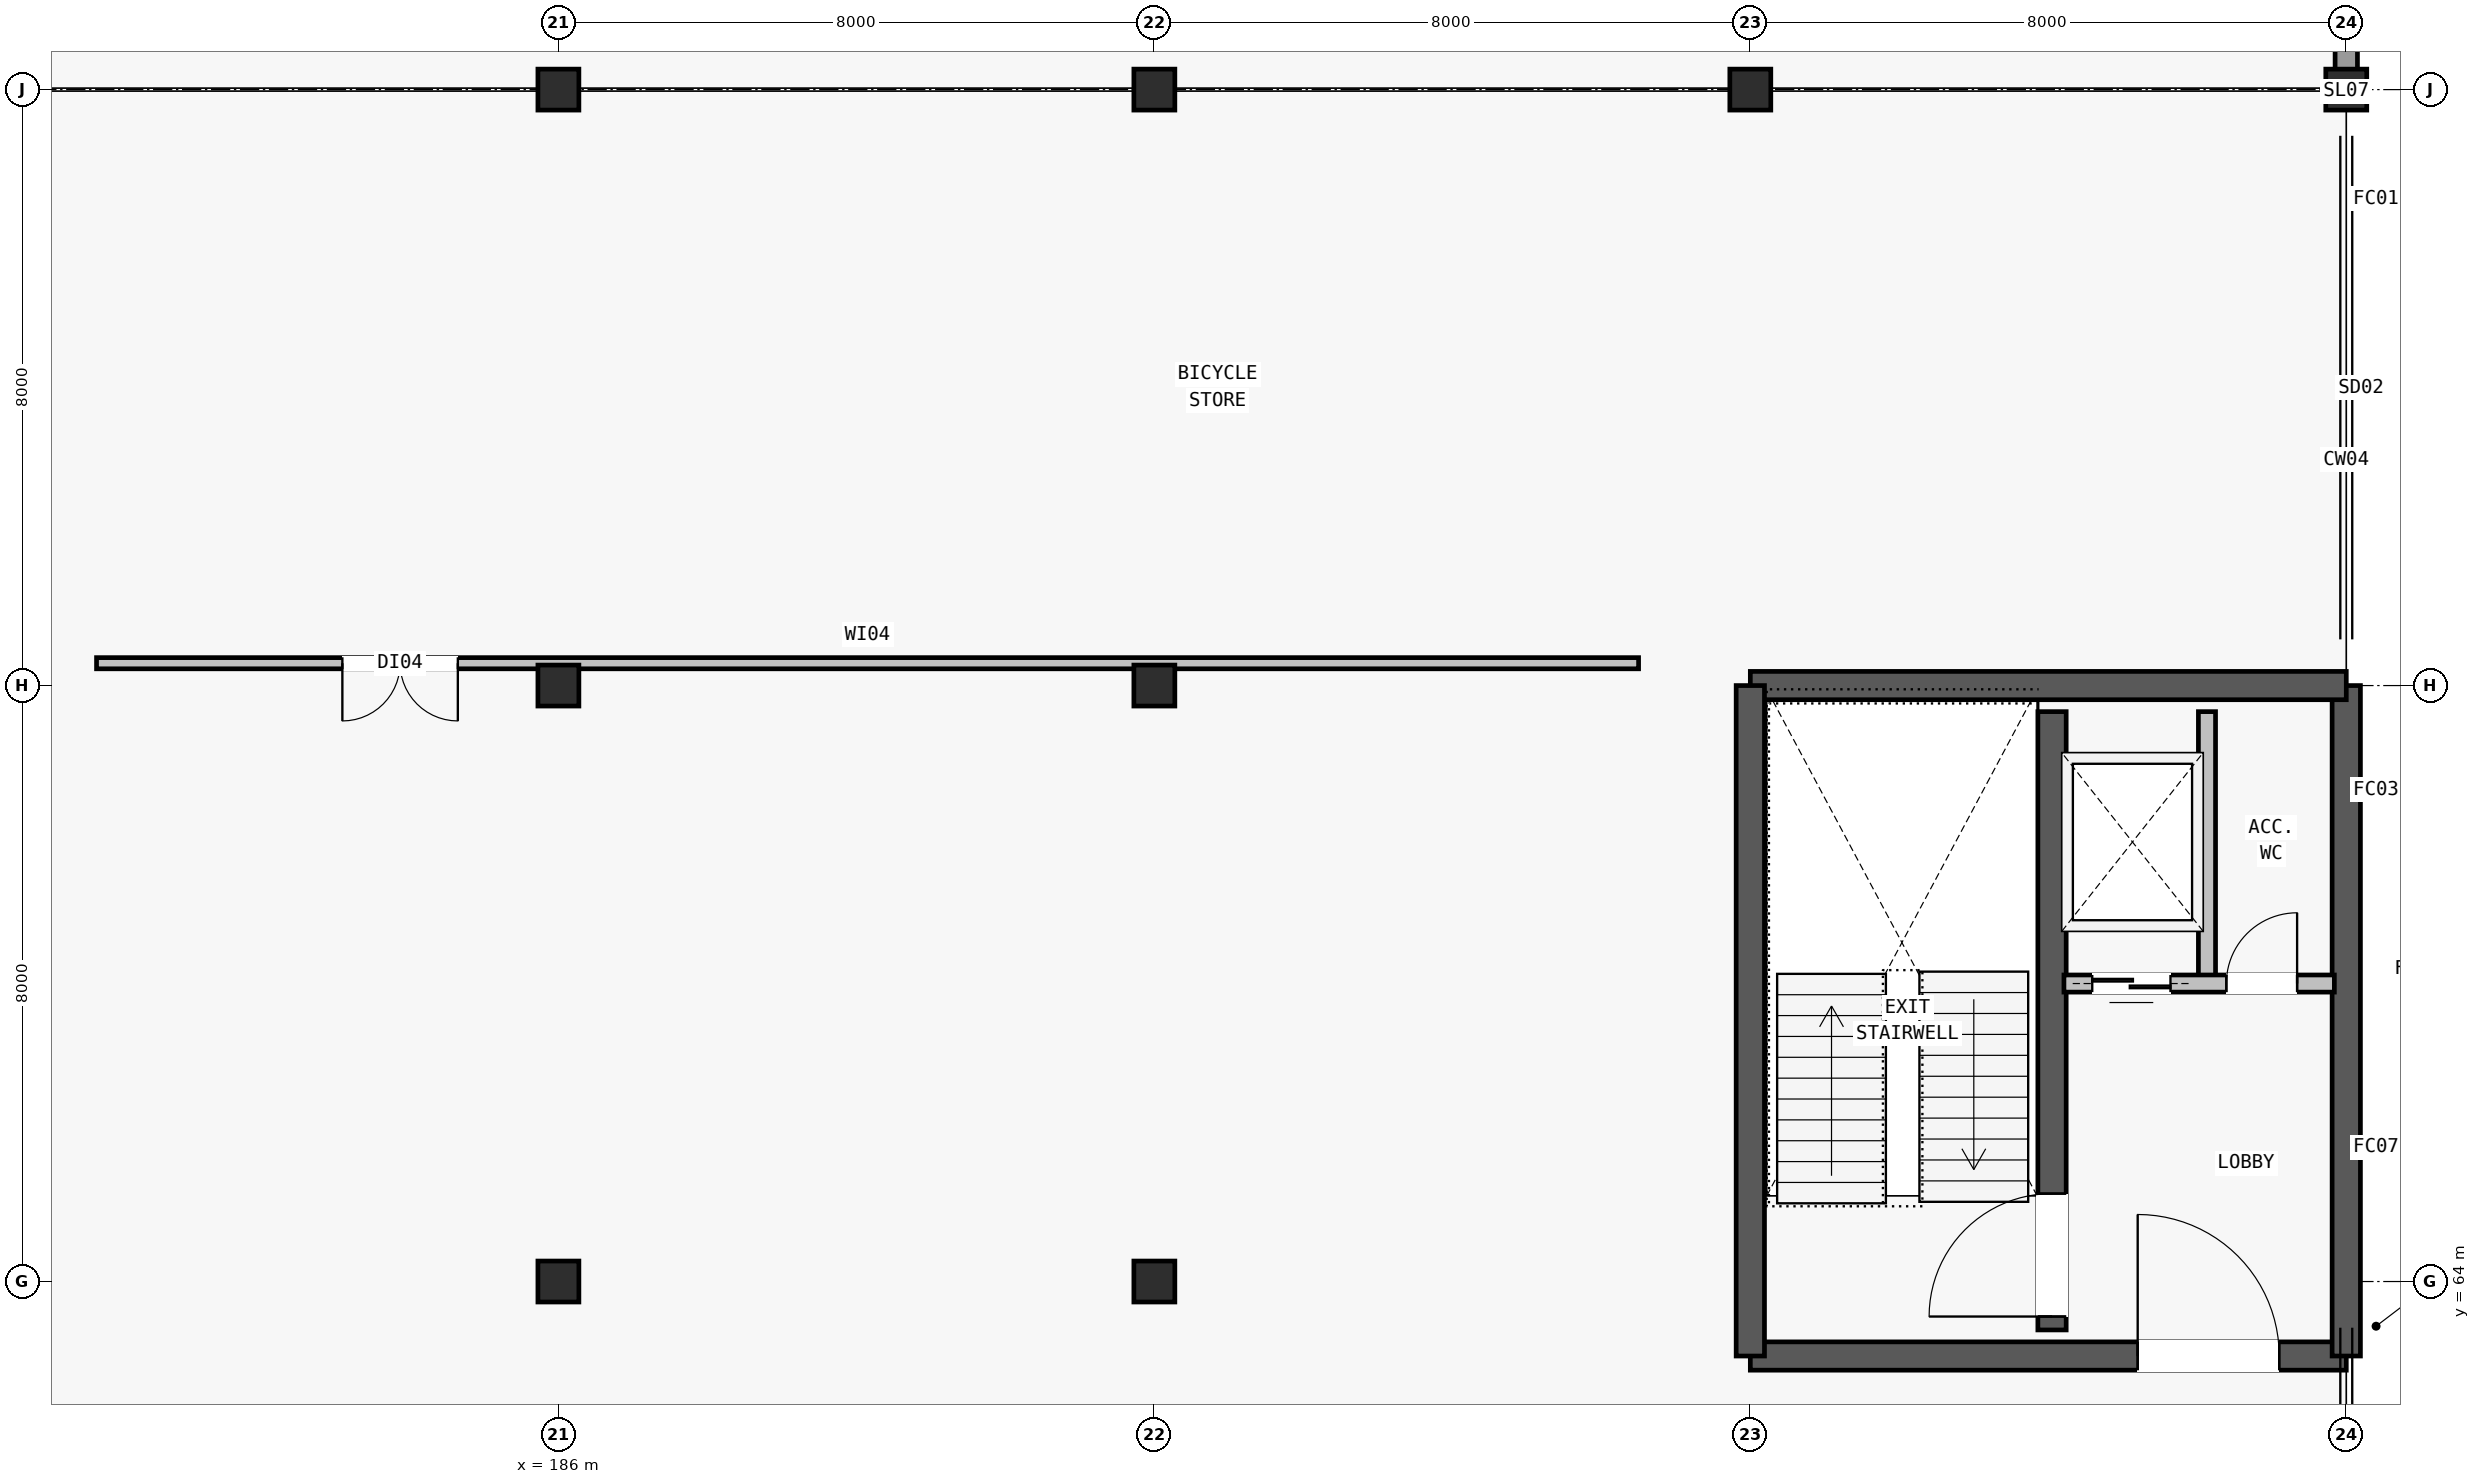
"""IFC4 building model, lengths in metres.
Left out: names, types, materials, properties, quantities, classifications, styles, units other than length and angle.
Written with IfcOpenShell. Run it as: python <this file> out.ifc"""

import sys

from ifc_helpers import new_model, si_unit, direction, frame, frame_2d, origin, origin_2d, place, context, subcontext, project, spatial, rectangle, extrude, element, fill, save


model = new_model("IFC4")
c1 = context("Model", 3, precision=1e-05, world=origin(), true_north=direction((0.0, 1.0)))
c2 = subcontext(c1, "Body", "Model", "MODEL_VIEW")
j1 = project(units=[si_unit("LENGTHUNIT", "METRE"), si_unit("PLANEANGLEUNIT", "RADIAN")], contexts=[c1])
p1 = place(None, origin())
s1 = spatial("IfcSite", under=j1, at=p1, CompositionType="ELEMENT")
p2 = place(p1, origin())
s2 = spatial("IfcBuilding", under=s1, at=p2, CompositionType="ELEMENT")
p3 = place(p2, frame((0.0, 0.0, 9.5)))
s3 = spatial("IfcBuildingStorey", under=s2, at=p3, CompositionType="ELEMENT", Elevation=9.5)
for number, where, z_axis, x_axis in (
    (1, (186.0, 64.0, 0.0), (0.0, 0.0, 1.0), (1.0, 0.0, 0.0)),
    (2, (186.0, 72.0, 0.0), (0.0, 0.0, 1.0), (1.0, 0.0, 0.0)),
    (3, (186.0, 80.0, 0.0), (0.0, 0.0, 1.0), (1.0, 0.0, 0.0)),
    (4, (194.0, 64.0, 0.0), (0.0, 0.0, 1.0), (1.0, 0.0, 0.0)),
    (5, (194.0, 72.0, 0.0), (0.0, 0.0, 1.0), (1.0, 0.0, 0.0)),
    (6, (194.0, 80.0, 0.0), (0.0, 0.0, 1.0), (1.0, 0.0, 0.0)),
    (7, (202.0, 80.0, 0.0), (0.0, 0.0, 1.0), (1.0, 0.0, 0.0)),
    (8, (210.0, 80.0, 0.0), (0.0, 0.0, 1.0), (1.0, 0.0, 0.0)),
):
    element("IfcColumn", number, at=place(p3, frame(where, z_axis=z_axis, x_axis=x_axis)), inside=s3, PredefinedType="COLUMN", context=c2, shape_type="SweptSolid", body=[
        extrude(rectangle(XDim=0.55, YDim=0.55, at=origin_2d()), origin(), (0.0, 0.0, 1.0), 3.9),
    ])
p4 = place(p3, frame((210.0, 80.255, 0.0), z_axis=(0.0, 0.0, 1.0), x_axis=(0.0, 1.0, 0.0)))
e9 = element("IfcWall", 9, at=p4, inside=s3, PredefinedType="STANDARD", context=c2, shape_type="SweptSolid", body=[
    extrude(rectangle(XDim=7.44, YDim=0.3, at=frame_2d((3.72, 0.0))), origin(), (0.0, 0.0, 1.0), 2.48),
])
p5 = place(p4, frame((2.225, 0.0, 0.95)))
e10 = element("IfcOpeningElement", 10, at=p5, cuts=e9, PredefinedType="OPENING", context=c2, shape_type="SweptSolid", body=[
    extrude(rectangle(XDim=0.9, YDim=1.2, at=frame_2d((0.45, 0.6))), frame((0.0, 0.16, 0.0), z_axis=(0.0, -1.0, 0.0), x_axis=(1.0, 0.0, 0.0)), (0.0, 0.0, 1.0), 0.32),
])
p6 = place(p3, frame((202.0, 63.0, 0.0), z_axis=(0.0, 0.0, 1.0), x_axis=(1.0, 0.0, 0.0)))
e11 = element("IfcWall", 11, at=p6, inside=s3, PredefinedType="SHEAR", context=c2, shape_type="SweptSolid", body=[
    extrude(rectangle(XDim=8.0, YDim=0.38, at=frame_2d((4.0, 0.0))), origin(), (0.0, 0.0, 1.0), 3.62),
])
p7 = place(p6, frame((5.2, 0.0, 0.0)))
e12 = element("IfcOpeningElement", 12, at=p7, cuts=e11, PredefinedType="OPENING", context=c2, shape_type="SweptSolid", body=[
    extrude(rectangle(XDim=1.9, YDim=2.3, at=frame_2d((0.95, 1.15))), frame((0.0, 0.2, 0.0), z_axis=(0.0, -1.0, 0.0), x_axis=(1.0, 0.0, 0.0)), (0.0, 0.0, 1.0), 0.4),
])
p8 = place(p3, frame((210.0, 63.0, 0.0), z_axis=(0.0, 0.0, 1.0), x_axis=(0.0, 1.0, 0.0)))
e13 = element("IfcWall", 13, at=p8, inside=s3, PredefinedType="SHEAR", context=c2, shape_type="SweptSolid", body=[
    extrude(rectangle(XDim=9.0, YDim=0.38, at=frame_2d((4.5, 0.0))), origin(), (0.0, 0.0, 1.0), 3.62),
])
p9 = place(p3, frame((210.0, 72.0, 0.0), z_axis=(0.0, 0.0, 1.0), x_axis=(-1.0, 0.0, 0.0)))
e14 = element("IfcWall", 14, at=p9, inside=s3, PredefinedType="SHEAR", context=c2, shape_type="SweptSolid", body=[
    extrude(rectangle(XDim=8.0, YDim=0.38, at=frame_2d((4.0, 0.0))), origin(), (0.0, 0.0, 1.0), 3.62),
])
p10 = place(p3, frame((202.0, 72.0, 0.0), z_axis=(0.0, 0.0, 1.0), x_axis=(0.0, -1.0, 0.0)))
e15 = element("IfcWall", 15, at=p10, inside=s3, PredefinedType="SHEAR", context=c2, shape_type="SweptSolid", body=[
    extrude(rectangle(XDim=9.0, YDim=0.38, at=frame_2d((4.5, 0.0))), origin(), (0.0, 0.0, 1.0), 3.62),
])
p11 = place(p3, frame((206.05, 63.35, 0.0), z_axis=(0.0, 0.0, 1.0), x_axis=(0.0, 1.0, 0.0)))
e16 = element("IfcWall", 16, at=p11, inside=s3, PredefinedType="SHEAR", context=c2, shape_type="SweptSolid", body=[
    extrude(rectangle(XDim=8.3, YDim=0.38, at=frame_2d((4.15, 0.0))), origin(), (0.0, 0.0, 1.0), 3.62),
])
p12 = place(p11, frame((0.18, 0.0, 0.0)))
e17 = element("IfcOpeningElement", 17, at=p12, cuts=e16, PredefinedType="OPENING", context=c2, shape_type="SweptSolid", body=[
    extrude(rectangle(XDim=1.65, YDim=2.2, at=frame_2d((0.825, 1.1))), frame((0.0, 0.2, 0.0), z_axis=(0.0, -1.0, 0.0), x_axis=(1.0, 0.0, 0.0)), (0.0, 0.0, 1.0), 0.4),
])
p13 = place(p3, frame((208.13, 68.0, 0.0), z_axis=(0.0, 0.0, 1.0), x_axis=(0.0, 1.0, 0.0)))
e18 = element("IfcWall", 18, at=p13, inside=s3, PredefinedType="PARTITIONING", context=c2, shape_type="SweptSolid", body=[
    extrude(rectangle(XDim=3.65, YDim=0.23, at=frame_2d((1.825, 0.0))), origin(), (0.0, 0.0, 1.0), 2.48),
])
p14 = place(p3, frame((206.21, 68.0, 0.0), z_axis=(0.0, 0.0, 1.0), x_axis=(1.0, 0.0, 0.0)))
e19 = element("IfcWall", 19, at=p14, inside=s3, PredefinedType="PARTITIONING", context=c2, shape_type="SweptSolid", body=[
    extrude(rectangle(XDim=3.63, YDim=0.23, at=frame_2d((1.815, 0.0))), origin(), (0.0, 0.0, 1.0), 2.48),
])
p15 = place(p14, frame((0.38, 0.0, 0.0)))
e20 = element("IfcOpeningElement", 20, at=p15, cuts=e19, PredefinedType="OPENING", context=c2, shape_type="SweptSolid", body=[
    extrude(rectangle(XDim=1.05, YDim=2.15, at=frame_2d((0.525, 1.075))), frame((0.0, 0.125, 0.0), z_axis=(0.0, -1.0, 0.0), x_axis=(1.0, 0.0, 0.0)), (0.0, 0.0, 1.0), 0.25),
])
p16 = place(p14, frame((2.18, 0.0, 0.0)))
e21 = element("IfcOpeningElement", 21, at=p16, cuts=e19, PredefinedType="OPENING", context=c2, shape_type="SweptSolid", body=[
    extrude(rectangle(XDim=0.95, YDim=2.1, at=frame_2d((0.475, 1.05))), frame((0.0, 0.125, 0.0), z_axis=(0.0, -1.0, 0.0), x_axis=(1.0, 0.0, 0.0)), (0.0, 0.0, 1.0), 0.25),
])
p17 = place(p3, frame((179.8, 72.3, 0.0), z_axis=(0.0, 0.0, 1.0), x_axis=(1.0, 0.0, 0.0)))
e22 = element("IfcWall", 22, at=p17, inside=s3, PredefinedType="PARTITIONING", context=c2, shape_type="SweptSolid", body=[
    extrude(rectangle(XDim=20.7, YDim=0.15, at=frame_2d((10.35, 0.0))), origin(), (0.0, 0.0, 1.0), 2.48),
])
p18 = place(p17, frame((3.3, 0.0, 0.0)))
e23 = element("IfcOpeningElement", 23, at=p18, cuts=e22, PredefinedType="OPENING", context=c2, shape_type="SweptSolid", body=[
    extrude(rectangle(XDim=1.55, YDim=2.2, at=frame_2d((0.775, 1.1))), frame((0.0, 0.085, 0.0), z_axis=(0.0, -1.0, 0.0), x_axis=(1.0, 0.0, 0.0)), (0.0, 0.0, 1.0), 0.17),
])
p19 = place(p7, origin())
e24 = element("IfcDoor", 24, at=p19, inside=s3, OperationType="SINGLE_SWING_LEFT", PredefinedType="DOOR", context=c2, shape_type="SweptSolid", body=[
    extrude(rectangle(XDim=1.9, YDim=2.3, at=frame_2d((0.95, 1.15))), frame((0.0, 0.025, 0.0), z_axis=(0.0, -1.0, 0.0), x_axis=(1.0, 0.0, 0.0)), (0.0, 0.0, 1.0), 0.05),
])
fill(e12, e24)
p20 = place(p12, origin())
e25 = element("IfcDoor", 25, at=p20, inside=s3, OperationType="SINGLE_SWING_LEFT", PredefinedType="DOOR", context=c2, shape_type="SweptSolid", body=[
    extrude(rectangle(XDim=1.65, YDim=2.2, at=frame_2d((0.825, 1.1))), frame((0.0, 0.025, 0.0), z_axis=(0.0, -1.0, 0.0), x_axis=(1.0, 0.0, 0.0)), (0.0, 0.0, 1.0), 0.05),
])
fill(e17, e25)
p21 = place(p15, origin())
e26 = element("IfcDoor", 26, at=p21, inside=s3, OperationType="SLIDING_TO_LEFT", PredefinedType="DOOR", context=c2, shape_type="SweptSolid", body=[
    extrude(rectangle(XDim=1.05, YDim=2.15, at=frame_2d((0.525, 1.075))), frame((0.0, 0.025, 0.0), z_axis=(0.0, -1.0, 0.0), x_axis=(1.0, 0.0, 0.0)), (0.0, 0.0, 1.0), 0.05),
])
fill(e20, e26)
p22 = place(p16, origin())
e27 = element("IfcDoor", 27, at=p22, inside=s3, OperationType="SINGLE_SWING_RIGHT", PredefinedType="DOOR", context=c2, shape_type="SweptSolid", body=[
    extrude(rectangle(XDim=0.95, YDim=2.1, at=frame_2d((0.475, 1.05))), frame((0.0, 0.025, 0.0), z_axis=(0.0, -1.0, 0.0), x_axis=(1.0, 0.0, 0.0)), (0.0, 0.0, 1.0), 0.05),
])
fill(e21, e27)
p23 = place(p18, origin())
e28 = element("IfcDoor", 28, at=p23, inside=s3, OperationType="DOUBLE_SWING_RIGHT", PredefinedType="DOOR", context=c2, shape_type="SweptSolid", body=[
    extrude(rectangle(XDim=1.55, YDim=2.2, at=frame_2d((0.775, 1.1))), frame((0.0, 0.025, 0.0), z_axis=(0.0, -1.0, 0.0), x_axis=(1.0, 0.0, 0.0)), (0.0, 0.0, 1.0), 0.05),
])
fill(e23, e28)
save(model, sys.argv[1])
